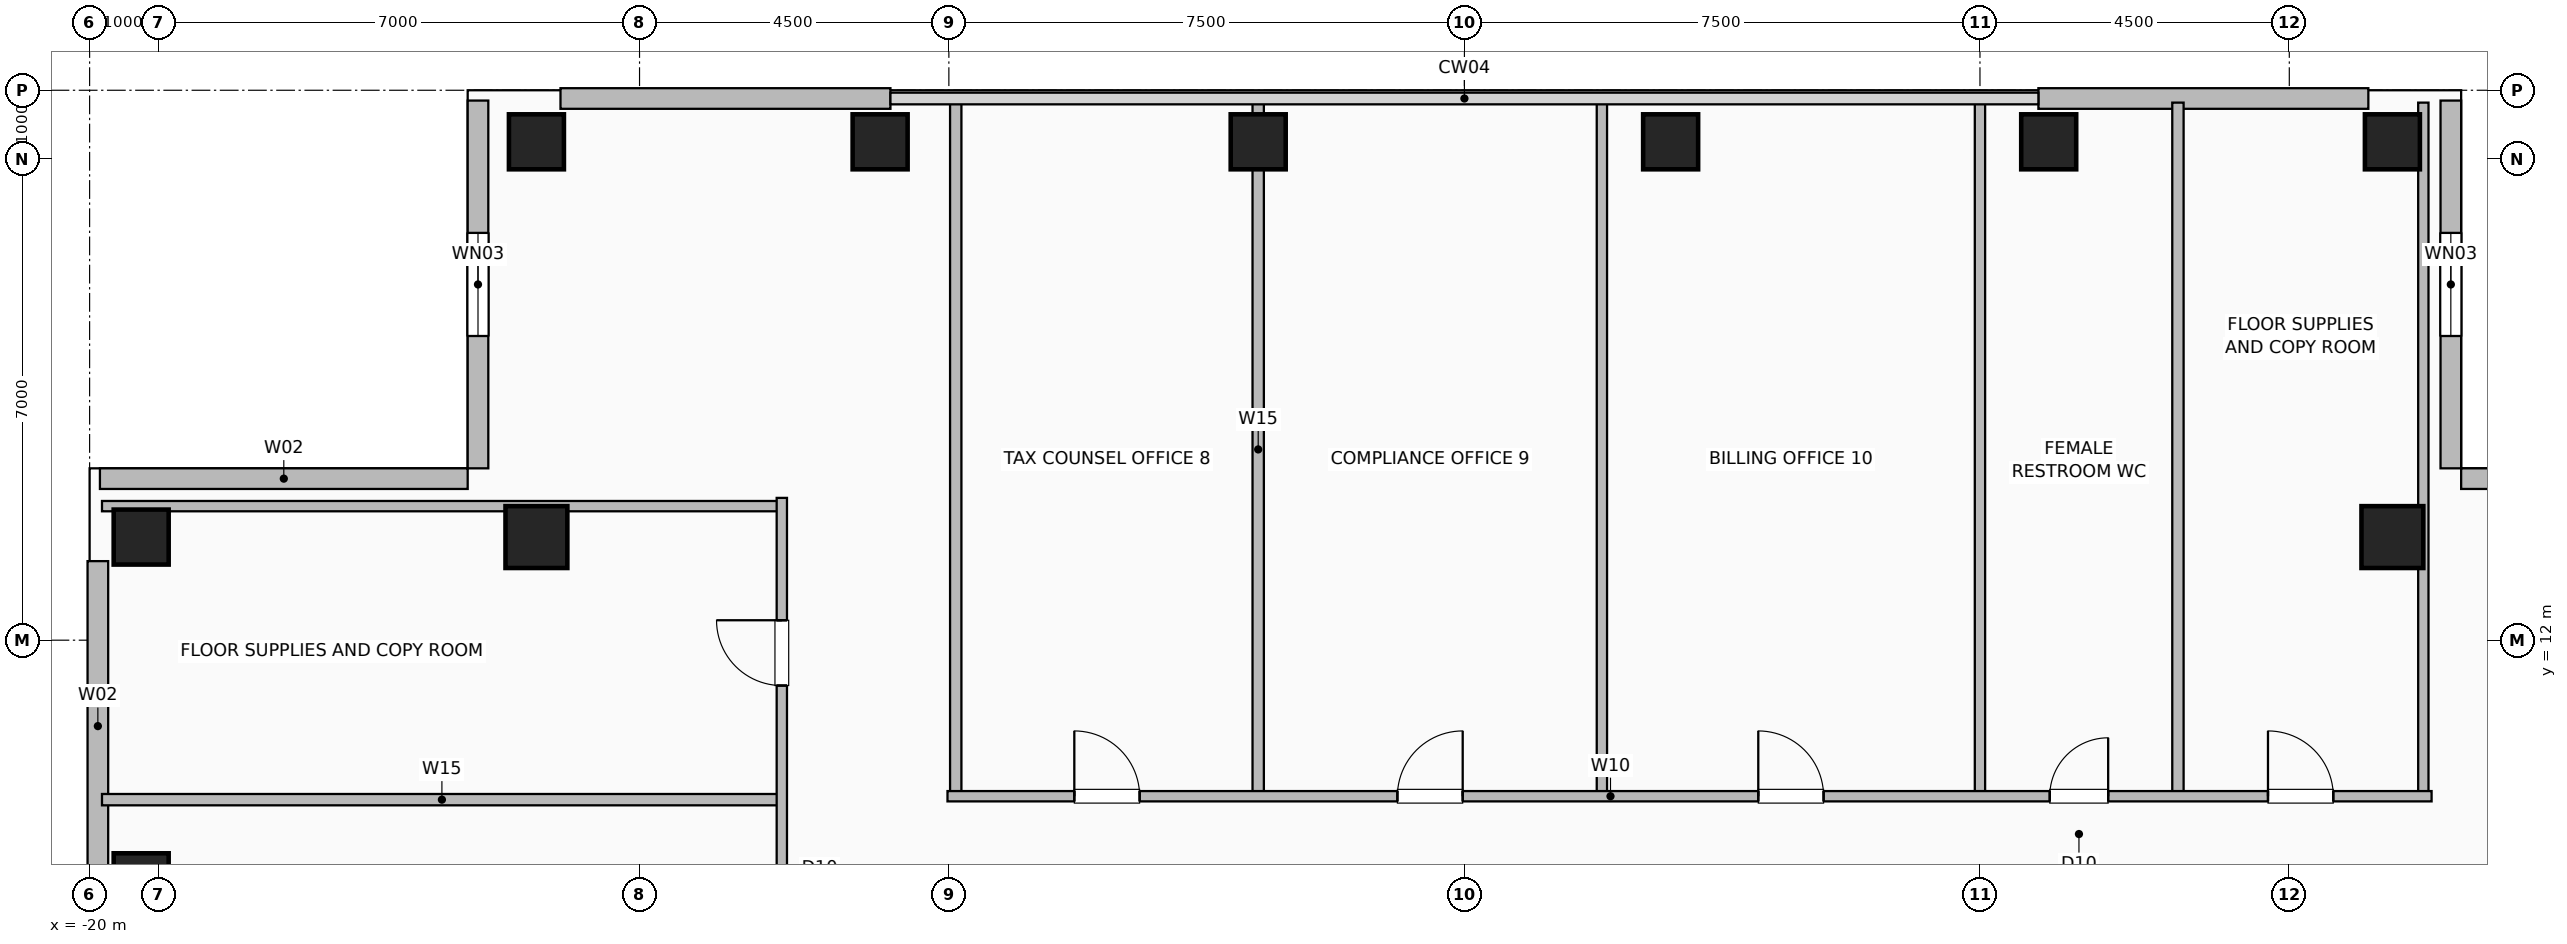
"""IFC4 building model, lengths in metres.
Left out: names, types, materials, properties, quantities, classifications, styles, units other than length and angle.
Written with IfcOpenShell. Run it as: python <this file> out.ifc"""

import sys

from ifc_helpers import new_model, si_unit, direction, frame, frame_2d, origin, origin_2d, place, context, subcontext, project, spatial, rectangle, hollow_rectangle, extrude, element, fill, save


model = new_model("IFC4")
c1 = context("Model", 3, precision=1e-05, world=origin(), true_north=direction((0.0, 1.0)))
c2 = subcontext(c1, "Body", "Model", "MODEL_VIEW")
j1 = project(units=[si_unit("LENGTHUNIT", "METRE"), si_unit("PLANEANGLEUNIT", "RADIAN")], contexts=[c1])
p1 = place(None, origin())
s1 = spatial("IfcSite", under=j1, at=p1, CompositionType="ELEMENT")
p2 = place(p1, origin())
s2 = spatial("IfcBuilding", under=s1, at=p2, CompositionType="ELEMENT")
p3 = place(p2, frame((0.0, 0.0, 169.8)))
s3 = spatial("IfcBuildingStorey", under=s2, at=p3, CompositionType="ELEMENT", Elevation=169.8)
for number, where, z_axis, x_axis in (
    (1, (-13.5, 19.25, 0.0), (0.0, 0.0, 1.0), (1.0, 0.0, 0.0)),
    (2, (-8.5, 19.25, 0.0), (0.0, 0.0, 1.0), (1.0, 0.0, 0.0)),
    (3, (-3.0, 19.25, 0.0), (0.0, 0.0, 1.0), (1.0, 0.0, 0.0)),
    (4, (3.0, 19.25, 0.0), (0.0, 0.0, 1.0), (1.0, 0.0, 0.0)),
    (5, (8.5, 19.25, 0.0), (0.0, 0.0, 1.0), (1.0, 0.0, 0.0)),
    (6, (-19.25, 8.5, 0.0), (0.0, 0.0, 1.0), (1.0, 0.0, 0.0)),
    (7, (13.5, 19.25, 0.0), (0.0, 0.0, 1.0), (1.0, 0.0, 0.0)),
    (8, (-19.25, 13.5, 0.0), (0.0, 0.0, 1.0), (1.0, 0.0, 0.0)),
):
    element("IfcColumn", number, at=place(p3, frame(where, z_axis=z_axis, x_axis=x_axis)), inside=s3, PredefinedType="COLUMN", context=c2, shape_type="SweptSolid", body=[
        extrude(hollow_rectangle(XDim=0.8, YDim=0.8, WallThickness=0.04, at=origin_2d()), origin(), (0.0, 0.0, 1.0), 3.6),
    ])
for number, where, z_axis, x_axis in (
    (9, (13.5, 13.5, 0.0), (0.0, 0.0, 1.0), (1.0, 0.0, 0.0)),
    (10, (-13.5, 13.5, 0.0), (0.0, 0.0, 1.0), (1.0, 0.0, 0.0)),
):
    element("IfcColumn", number, at=place(p3, frame(where, z_axis=z_axis, x_axis=x_axis)), inside=s3, PredefinedType="COLUMN", context=c2, shape_type="SweptSolid", body=[
        extrude(hollow_rectangle(XDim=0.9, YDim=0.9, WallThickness=0.045, at=origin_2d()), origin(), (0.0, 0.0, 1.0), 3.6),
    ])
for number, where, z_axis, x_axis in (
    (11, (-13.15, 19.88, 0.0), (0.0, 0.0, 1.0), (1.0, 0.0, 0.0)),
    (12, (8.35, 19.88, 0.0), (0.0, 0.0, 1.0), (1.0, 0.0, 0.0)),
    (13, (-19.88, 8.35, 0.0), (0.0, 0.0, 1.0), (0.0, 1.0, 0.0)),
):
    element("IfcWall", number, at=place(p3, frame(where, z_axis=z_axis, x_axis=x_axis)), inside=s3, PredefinedType="SOLIDWALL", context=c2, shape_type="SweptSolid", body=[
        extrude(rectangle(XDim=4.8, YDim=0.3, at=frame_2d((2.4, 0.0))), origin(), (0.0, 0.0, 1.0), 3.36),
    ])
p4 = place(p3, frame((14.35, 19.85, 0.0), z_axis=(0.0, 0.0, 1.0), x_axis=(0.0, -1.0, 0.0)))
e14 = element("IfcWall", 14, at=p4, inside=s3, PredefinedType="SOLIDWALL", context=c2, shape_type="SweptSolid", body=[
    extrude(rectangle(XDim=5.35, YDim=0.3, at=frame_2d((2.675, 0.0))), origin(), (0.0, 0.0, 1.0), 3.36),
])
p5 = place(p4, frame((1.925, 0.0, 0.9)))
e15 = element("IfcOpeningElement", 15, at=p5, cuts=e14, PredefinedType="OPENING", context=c2, shape_type="SweptSolid", body=[
    extrude(rectangle(XDim=1.5, YDim=1.8, at=frame_2d((0.75, 0.9))), frame((0.0, 0.16, 0.0), z_axis=(0.0, -1.0, 0.0), x_axis=(1.0, 0.0, 0.0)), (0.0, 0.0, 1.0), 0.32),
])
p6 = place(p3, frame((19.85, 14.35, 0.0), z_axis=(0.0, 0.0, 1.0), x_axis=(-1.0, 0.0, 0.0)))
e16 = element("IfcWall", 16, at=p6, inside=s3, PredefinedType="SOLIDWALL", context=c2, shape_type="SweptSolid", body=[
    extrude(rectangle(XDim=5.35, YDim=0.3, at=frame_2d((2.675, 0.0))), origin(), (0.0, 0.0, 1.0), 3.36),
])
p7 = place(p3, frame((-14.35, 19.85, 0.0), z_axis=(0.0, 0.0, 1.0), x_axis=(0.0, -1.0, 0.0)))
e17 = element("IfcWall", 17, at=p7, inside=s3, PredefinedType="SOLIDWALL", context=c2, shape_type="SweptSolid", body=[
    extrude(rectangle(XDim=5.35, YDim=0.3, at=frame_2d((2.675, 0.0))), origin(), (0.0, 0.0, 1.0), 3.36),
])
p8 = place(p7, frame((1.925, 0.0, 0.9)))
e18 = element("IfcOpeningElement", 18, at=p8, cuts=e17, PredefinedType="OPENING", context=c2, shape_type="SweptSolid", body=[
    extrude(rectangle(XDim=1.5, YDim=1.8, at=frame_2d((0.75, 0.9))), frame((0.0, 0.16, 0.0), z_axis=(0.0, -1.0, 0.0), x_axis=(1.0, 0.0, 0.0)), (0.0, 0.0, 1.0), 0.32),
])
p9 = place(p3, frame((-19.85, 14.35, 0.0), z_axis=(0.0, 0.0, 1.0), x_axis=(1.0, 0.0, 0.0)))
e19 = element("IfcWall", 19, at=p9, inside=s3, PredefinedType="SOLIDWALL", context=c2, shape_type="SweptSolid", body=[
    extrude(rectangle(XDim=5.35, YDim=0.3, at=frame_2d((2.675, 0.0))), origin(), (0.0, 0.0, 1.0), 3.36),
])
p10 = place(p3, frame((-19.82, 9.68, 0.0), z_axis=(0.0, 0.0, 1.0), x_axis=(1.0, 0.0, 0.0)))
e20 = element("IfcWall", 20, at=p10, inside=s3, PredefinedType="PLUMBINGWALL", context=c2, shape_type="SweptSolid", body=[
    extrude(rectangle(XDim=9.89, YDim=0.165, at=frame_2d((4.945, 0.0))), origin(), (0.0, 0.0, 1.0), 3.36),
])
p11 = place(p3, frame((-19.82, 13.95, 0.0), z_axis=(0.0, 0.0, 1.0), x_axis=(1.0, 0.0, 0.0)))
e21 = element("IfcWall", 21, at=p11, inside=s3, PredefinedType="PARTITIONING", context=c2, shape_type="SweptSolid", body=[
    extrude(rectangle(XDim=9.89, YDim=0.15, at=frame_2d((4.945, 0.0))), origin(), (0.0, 0.0, 1.0), 3.36),
])
p12 = place(p3, frame((-9.93, -7.52, 0.0), z_axis=(0.0, 0.0, 1.0), x_axis=(0.0, 1.0, 0.0)))
e22 = element("IfcWall", 22, at=p12, inside=s3, PredefinedType="PARTITIONING", context=c2, shape_type="SweptSolid", body=[
    extrude(rectangle(XDim=21.59, YDim=0.15, at=frame_2d((10.795, 0.0))), origin(), (0.0, 0.0, 1.0), 3.36),
])
p13 = place(p12, frame((1.745, 0.0, 0.0)))
e23 = element("IfcOpeningElement", 23, at=p13, cuts=e22, PredefinedType="OPENING", context=c2, shape_type="SweptSolid", body=[
    extrude(rectangle(XDim=0.95, YDim=2.06, at=frame_2d((0.475, 1.03))), frame((0.0, 0.085, 0.0), z_axis=(0.0, -1.0, 0.0), x_axis=(1.0, 0.0, 0.0)), (0.0, 0.0, 1.0), 0.17),
])
p14 = place(p12, frame((6.195, 0.0, 0.0)))
e24 = element("IfcOpeningElement", 24, at=p14, cuts=e22, PredefinedType="OPENING", context=c2, shape_type="SweptSolid", body=[
    extrude(rectangle(XDim=0.95, YDim=2.06, at=frame_2d((0.475, 1.03))), frame((0.0, 0.085, 0.0), z_axis=(0.0, -1.0, 0.0), x_axis=(1.0, 0.0, 0.0)), (0.0, 0.0, 1.0), 0.17),
])
p15 = place(p12, frame((11.195, 0.0, 0.0)))
e25 = element("IfcOpeningElement", 25, at=p15, cuts=e22, PredefinedType="OPENING", context=c2, shape_type="SweptSolid", body=[
    extrude(rectangle(XDim=0.95, YDim=2.06, at=frame_2d((0.475, 1.03))), frame((0.0, 0.085, 0.0), z_axis=(0.0, -1.0, 0.0), x_axis=(1.0, 0.0, 0.0)), (0.0, 0.0, 1.0), 0.17),
])
p16 = place(p12, frame((15.335, 0.0, 0.0)))
e26 = element("IfcOpeningElement", 26, at=p16, cuts=e22, PredefinedType="OPENING", context=c2, shape_type="SweptSolid", body=[
    extrude(rectangle(XDim=0.85, YDim=2.05, at=frame_2d((0.425, 1.025))), frame((0.0, 0.085, 0.0), z_axis=(0.0, -1.0, 0.0), x_axis=(1.0, 0.0, 0.0)), (0.0, 0.0, 1.0), 0.17),
])
p17 = place(p12, frame((18.86, 0.0, 0.0)))
e27 = element("IfcOpeningElement", 27, at=p17, cuts=e22, PredefinedType="OPENING", context=c2, shape_type="SweptSolid", body=[
    extrude(rectangle(XDim=0.95, YDim=2.06, at=frame_2d((0.475, 1.03))), frame((0.0, 0.085, 0.0), z_axis=(0.0, -1.0, 0.0), x_axis=(1.0, 0.0, 0.0)), (0.0, 0.0, 1.0), 0.17),
])
for number, where, z_axis, x_axis in (
    (28, (10.38, 9.73, 0.0), (0.0, 0.0, 1.0), (0.0, 1.0, 0.0)),
    (29, (-7.4, 9.73, 0.0), (0.0, 0.0, 1.0), (0.0, 1.0, 0.0)),
):
    element("IfcWall", number, at=place(p3, frame(where, z_axis=z_axis, x_axis=x_axis)), inside=s3, PredefinedType="PLUMBINGWALL", context=c2, shape_type="SweptSolid", body=[
        extrude(rectangle(XDim=10.09, YDim=0.165, at=frame_2d((5.045, 0.0))), origin(), (0.0, 0.0, 1.0), 3.36),
    ])
p18 = place(p3, frame((-3.0, 9.73, 0.0), z_axis=(0.0, 0.0, 1.0), x_axis=(0.0, 1.0, 0.0)))
e30 = element("IfcWall", 30, at=p18, inside=s3, PredefinedType="PLUMBINGWALL", context=c2, shape_type="SweptSolid", body=[
    extrude(rectangle(XDim=10.09, YDim=0.165, at=frame_2d((5.045, 0.0))), origin(), (0.0, 0.0, 1.0), 2.792),
])
for number, where, z_axis, x_axis in (
    (31, (2.0, 9.73, 0.0), (0.0, 0.0, 1.0), (0.0, 1.0, 0.0)),
    (32, (7.5, 9.73, 0.0), (0.0, 0.0, 1.0), (0.0, 1.0, 0.0)),
    (33, (13.95, 9.73, 0.0), (0.0, 0.0, 1.0), (0.0, 1.0, 0.0)),
):
    element("IfcWall", number, at=place(p3, frame(where, z_axis=z_axis, x_axis=x_axis)), inside=s3, PredefinedType="PARTITIONING", context=c2, shape_type="SweptSolid", body=[
        extrude(rectangle(XDim=10.09, YDim=0.15, at=frame_2d((5.045, 0.0))), origin(), (0.0, 0.0, 1.0), 3.36),
    ])
p19 = place(p3, frame((-7.52, 9.73, 0.0), z_axis=(0.0, 0.0, 1.0), x_axis=(1.0, 0.0, 0.0)))
e34 = element("IfcWall", 34, at=p19, inside=s3, PredefinedType="PARTITIONING", context=c2, shape_type="SweptSolid", body=[
    extrude(rectangle(XDim=21.59, YDim=0.15, at=frame_2d((10.795, 0.0))), origin(), (0.0, 0.0, 1.0), 3.36),
])
p20 = place(p19, frame((1.845, 0.0, 0.0)))
e35 = element("IfcOpeningElement", 35, at=p20, cuts=e34, PredefinedType="OPENING", context=c2, shape_type="SweptSolid", body=[
    extrude(rectangle(XDim=0.95, YDim=2.06, at=frame_2d((0.475, 1.03))), frame((0.0, 0.085, 0.0), z_axis=(0.0, -1.0, 0.0), x_axis=(1.0, 0.0, 0.0)), (0.0, 0.0, 1.0), 0.17),
])
p21 = place(p19, frame((6.545, 0.0, 0.0)))
e36 = element("IfcOpeningElement", 36, at=p21, cuts=e34, PredefinedType="OPENING", context=c2, shape_type="SweptSolid", body=[
    extrude(rectangle(XDim=0.95, YDim=2.06, at=frame_2d((0.475, 1.03))), frame((0.0, 0.085, 0.0), z_axis=(0.0, -1.0, 0.0), x_axis=(1.0, 0.0, 0.0)), (0.0, 0.0, 1.0), 0.17),
])
p22 = place(p19, frame((11.795, 0.0, 0.0)))
e37 = element("IfcOpeningElement", 37, at=p22, cuts=e34, PredefinedType="OPENING", context=c2, shape_type="SweptSolid", body=[
    extrude(rectangle(XDim=0.95, YDim=2.06, at=frame_2d((0.475, 1.03))), frame((0.0, 0.085, 0.0), z_axis=(0.0, -1.0, 0.0), x_axis=(1.0, 0.0, 0.0)), (0.0, 0.0, 1.0), 0.17),
])
p23 = place(p19, frame((16.035, 0.0, 0.0)))
e38 = element("IfcOpeningElement", 38, at=p23, cuts=e34, PredefinedType="OPENING", context=c2, shape_type="SweptSolid", body=[
    extrude(rectangle(XDim=0.85, YDim=2.05, at=frame_2d((0.425, 1.025))), frame((0.0, 0.085, 0.0), z_axis=(0.0, -1.0, 0.0), x_axis=(1.0, 0.0, 0.0)), (0.0, 0.0, 1.0), 0.17),
])
p24 = place(p19, frame((19.21, 0.0, 0.0)))
e39 = element("IfcOpeningElement", 39, at=p24, cuts=e34, PredefinedType="OPENING", context=c2, shape_type="SweptSolid", body=[
    extrude(rectangle(XDim=0.95, YDim=2.06, at=frame_2d((0.475, 1.03))), frame((0.0, 0.085, 0.0), z_axis=(0.0, -1.0, 0.0), x_axis=(1.0, 0.0, 0.0)), (0.0, 0.0, 1.0), 0.17),
])
p25 = place(p5, origin())
e40 = element("IfcWindow", 40, at=p25, inside=s3, PartitioningType="SINGLE_PANEL", PredefinedType="WINDOW", context=c2, shape_type="SweptSolid", body=[
    extrude(rectangle(XDim=1.5, YDim=1.8, at=frame_2d((0.75, 0.9))), frame((0.0, 0.03, 0.0), z_axis=(0.0, -1.0, 0.0), x_axis=(1.0, 0.0, 0.0)), (0.0, 0.0, 1.0), 0.06),
])
fill(e15, e40)
p26 = place(p8, origin())
e41 = element("IfcWindow", 41, at=p26, inside=s3, PartitioningType="SINGLE_PANEL", PredefinedType="WINDOW", context=c2, shape_type="SweptSolid", body=[
    extrude(rectangle(XDim=1.5, YDim=1.8, at=frame_2d((0.75, 0.9))), frame((0.0, 0.03, 0.0), z_axis=(0.0, -1.0, 0.0), x_axis=(1.0, 0.0, 0.0)), (0.0, 0.0, 1.0), 0.06),
])
fill(e18, e41)
p27 = place(p17, origin())
e42 = element("IfcDoor", 42, at=p27, inside=s3, OperationType="SINGLE_SWING_RIGHT", PredefinedType="DOOR", context=c2, shape_type="SweptSolid", body=[
    extrude(rectangle(XDim=0.95, YDim=2.06, at=frame_2d((0.475, 1.03))), frame((0.0, 0.025, 0.0), z_axis=(0.0, -1.0, 0.0), x_axis=(1.0, 0.0, 0.0)), (0.0, 0.0, 1.0), 0.05),
])
fill(e27, e42)
p28 = place(p20, origin())
e43 = element("IfcDoor", 43, at=p28, inside=s3, OperationType="SINGLE_SWING_LEFT", PredefinedType="DOOR", context=c2, shape_type="SweptSolid", body=[
    extrude(rectangle(XDim=0.95, YDim=2.06, at=frame_2d((0.475, 1.03))), frame((0.0, 0.025, 0.0), z_axis=(0.0, -1.0, 0.0), x_axis=(1.0, 0.0, 0.0)), (0.0, 0.0, 1.0), 0.05),
])
fill(e35, e43)
p29 = place(p21, origin())
e44 = element("IfcDoor", 44, at=p29, inside=s3, OperationType="SINGLE_SWING_RIGHT", PredefinedType="DOOR", context=c2, shape_type="SweptSolid", body=[
    extrude(rectangle(XDim=0.95, YDim=2.06, at=frame_2d((0.475, 1.03))), frame((0.0, 0.025, 0.0), z_axis=(0.0, -1.0, 0.0), x_axis=(1.0, 0.0, 0.0)), (0.0, 0.0, 1.0), 0.05),
])
fill(e36, e44)
p30 = place(p22, origin())
e45 = element("IfcDoor", 45, at=p30, inside=s3, OperationType="SINGLE_SWING_LEFT", PredefinedType="DOOR", context=c2, shape_type="SweptSolid", body=[
    extrude(rectangle(XDim=0.95, YDim=2.06, at=frame_2d((0.475, 1.03))), frame((0.0, 0.025, 0.0), z_axis=(0.0, -1.0, 0.0), x_axis=(1.0, 0.0, 0.0)), (0.0, 0.0, 1.0), 0.05),
])
fill(e37, e45)
p31 = place(p23, origin())
e46 = element("IfcDoor", 46, at=p31, inside=s3, OperationType="SINGLE_SWING_RIGHT", PredefinedType="DOOR", context=c2, shape_type="SweptSolid", body=[
    extrude(rectangle(XDim=0.85, YDim=2.05, at=frame_2d((0.425, 1.025))), frame((0.0, 0.025, 0.0), z_axis=(0.0, -1.0, 0.0), x_axis=(1.0, 0.0, 0.0)), (0.0, 0.0, 1.0), 0.05),
])
fill(e38, e46)
p32 = place(p24, origin())
e47 = element("IfcDoor", 47, at=p32, inside=s3, OperationType="SINGLE_SWING_LEFT", PredefinedType="DOOR", context=c2, shape_type="SweptSolid", body=[
    extrude(rectangle(XDim=0.95, YDim=2.06, at=frame_2d((0.475, 1.03))), frame((0.0, 0.025, 0.0), z_axis=(0.0, -1.0, 0.0), x_axis=(1.0, 0.0, 0.0)), (0.0, 0.0, 1.0), 0.05),
])
fill(e39, e47)
save(model, sys.argv[1])
